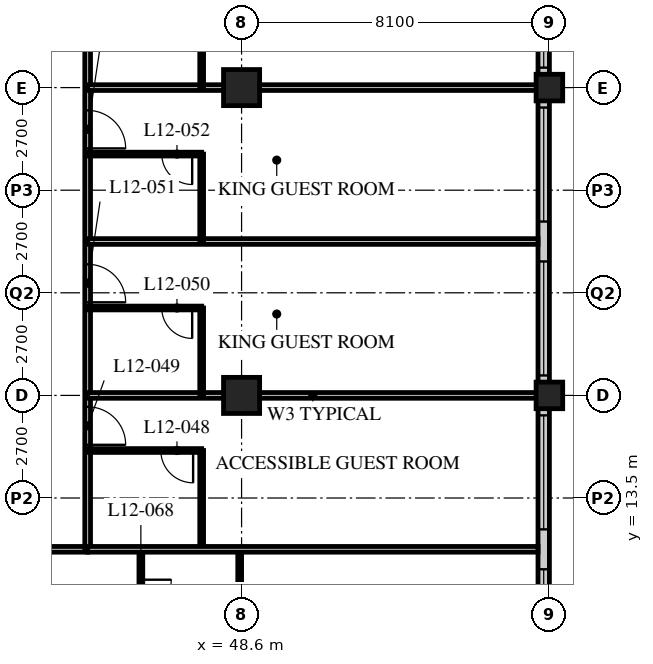
"""IFC4 building model, lengths in metres.
Left out: names, types, materials, properties, quantities, classifications, styles, units other than length and angle.
Written with IfcOpenShell. Run it as: python <this file> out.ifc"""

import sys

from ifc_helpers import new_model, si_unit, direction, frame, frame_2d, origin, origin_2d, place, context, subcontext, project, spatial, rectangle, hollow_rectangle, extrude, element, fill, save


model = new_model("IFC4")
c1 = context("Model", 3, precision=1e-05, world=origin(), true_north=direction((0.0, 1.0)))
c2 = subcontext(c1, "Body", "Model", "MODEL_VIEW")
j1 = project(units=[si_unit("LENGTHUNIT", "METRE"), si_unit("PLANEANGLEUNIT", "RADIAN")], contexts=[c1])
p1 = place(None, origin())
s1 = spatial("IfcSite", under=j1, at=p1, CompositionType="ELEMENT")
p2 = place(p1, origin())
s2 = spatial("IfcBuilding", under=s1, at=p2, CompositionType="ELEMENT")
p3 = place(p2, frame((0.0, 0.0, 53.4)))
s3 = spatial("IfcBuildingStorey", under=s2, at=p3, CompositionType="ELEMENT", Elevation=53.4)
for number, where, z_axis, x_axis in (
    (1, (48.6, 16.2, 0.0), (0.0, 0.0, 1.0), (1.0, 0.0, 0.0)),
    (2, (48.6, 24.3, 0.0), (0.0, 0.0, 1.0), (1.0, 0.0, 0.0)),
):
    element("IfcColumn", number, at=place(p3, frame(where, z_axis=z_axis, x_axis=x_axis)), inside=s3, PredefinedType="COLUMN", context=c2, shape_type="SweptSolid", body=[
        extrude(hollow_rectangle(XDim=0.95, YDim=0.95, WallThickness=0.095, at=origin_2d()), origin(), (0.0, 0.0, 1.0), 3.4),
    ])
for number, where, z_axis, x_axis in (
    (3, (56.7, 16.2, 0.0), (0.0, 0.0, 1.0), (1.0, 0.0, 0.0)),
    (4, (56.7, 24.3, 0.0), (0.0, 0.0, 1.0), (1.0, 0.0, 0.0)),
):
    element("IfcColumn", number, at=place(p3, frame(where, z_axis=z_axis, x_axis=x_axis)), inside=s3, PredefinedType="COLUMN", context=c2, shape_type="SweptSolid", body=[
        extrude(hollow_rectangle(XDim=0.7, YDim=0.7, WallThickness=0.06, at=origin_2d()), origin(), (0.0, 0.0, 1.0), 3.4),
    ])
p4 = place(p3, frame((56.55, 8.4, 0.0), z_axis=(0.0, 0.0, 1.0), x_axis=(0.0, 1.0, 0.0)))
e5 = element("IfcWall", 5, at=p4, inside=s3, PredefinedType="SOLIDWALL", context=c2, shape_type="SweptSolid", body=[
    extrude(rectangle(XDim=32.1, YDim=0.3, at=frame_2d((16.05, 0.0))), origin(), (0.0, 0.0, 1.0), 3.19),
])
p5 = place(p4, frame((0.225, 0.0, 0.9)))
e6 = element("IfcOpeningElement", 6, at=p5, cuts=e5, PredefinedType="OPENING", context=c2, shape_type="SweptSolid", body=[
    extrude(rectangle(XDim=3.0, YDim=2.0, at=frame_2d((1.5, 1.0))), frame((0.0, 0.16, 0.0), z_axis=(0.0, -1.0, 0.0), x_axis=(1.0, 0.0, 0.0)), (0.0, 0.0, 1.0), 0.32),
])
p6 = place(p4, frame((4.275, 0.0, 0.9)))
e7 = element("IfcOpeningElement", 7, at=p6, cuts=e5, PredefinedType="OPENING", context=c2, shape_type="SweptSolid", body=[
    extrude(rectangle(XDim=3.0, YDim=2.0, at=frame_2d((1.5, 1.0))), frame((0.0, 0.16, 0.0), z_axis=(0.0, -1.0, 0.0), x_axis=(1.0, 0.0, 0.0)), (0.0, 0.0, 1.0), 0.32),
])
p7 = place(p4, frame((8.325, 0.0, 0.9)))
e8 = element("IfcOpeningElement", 8, at=p7, cuts=e5, PredefinedType="OPENING", context=c2, shape_type="SweptSolid", body=[
    extrude(rectangle(XDim=3.0, YDim=2.0, at=frame_2d((1.5, 1.0))), frame((0.0, 0.16, 0.0), z_axis=(0.0, -1.0, 0.0), x_axis=(1.0, 0.0, 0.0)), (0.0, 0.0, 1.0), 0.32),
])
p8 = place(p4, frame((12.375, 0.0, 0.9)))
e9 = element("IfcOpeningElement", 9, at=p8, cuts=e5, PredefinedType="OPENING", context=c2, shape_type="SweptSolid", body=[
    extrude(rectangle(XDim=3.0, YDim=2.0, at=frame_2d((1.5, 1.0))), frame((0.0, 0.16, 0.0), z_axis=(0.0, -1.0, 0.0), x_axis=(1.0, 0.0, 0.0)), (0.0, 0.0, 1.0), 0.32),
])
p9 = place(p4, frame((16.425, 0.0, 0.9)))
e10 = element("IfcOpeningElement", 10, at=p9, cuts=e5, PredefinedType="OPENING", context=c2, shape_type="SweptSolid", body=[
    extrude(rectangle(XDim=3.0, YDim=2.0, at=frame_2d((1.5, 1.0))), frame((0.0, 0.16, 0.0), z_axis=(0.0, -1.0, 0.0), x_axis=(1.0, 0.0, 0.0)), (0.0, 0.0, 1.0), 0.32),
])
p10 = place(p4, frame((20.475, 0.0, 0.9)))
e11 = element("IfcOpeningElement", 11, at=p10, cuts=e5, PredefinedType="OPENING", context=c2, shape_type="SweptSolid", body=[
    extrude(rectangle(XDim=3.0, YDim=2.0, at=frame_2d((1.5, 1.0))), frame((0.0, 0.16, 0.0), z_axis=(0.0, -1.0, 0.0), x_axis=(1.0, 0.0, 0.0)), (0.0, 0.0, 1.0), 0.32),
])
p11 = place(p4, frame((24.525, 0.0, 0.9)))
e12 = element("IfcOpeningElement", 12, at=p11, cuts=e5, PredefinedType="OPENING", context=c2, shape_type="SweptSolid", body=[
    extrude(rectangle(XDim=3.0, YDim=2.0, at=frame_2d((1.5, 1.0))), frame((0.0, 0.16, 0.0), z_axis=(0.0, -1.0, 0.0), x_axis=(1.0, 0.0, 0.0)), (0.0, 0.0, 1.0), 0.32),
])
p12 = place(p4, frame((28.575, 0.0, 0.9)))
e13 = element("IfcOpeningElement", 13, at=p12, cuts=e5, PredefinedType="OPENING", context=c2, shape_type="SweptSolid", body=[
    extrude(rectangle(XDim=3.0, YDim=2.0, at=frame_2d((1.5, 1.0))), frame((0.0, 0.16, 0.0), z_axis=(0.0, -1.0, 0.0), x_axis=(1.0, 0.0, 0.0)), (0.0, 0.0, 1.0), 0.32),
])
p13 = place(p3, frame((12.15, 12.15, 0.0), z_axis=(0.0, 0.0, 1.0), x_axis=(1.0, 0.0, 0.0)))
e14 = element("IfcWall", 14, at=p13, inside=s3, PredefinedType="PARTITIONING", context=c2, shape_type="SweptSolid", body=[
    extrude(rectangle(XDim=32.4, YDim=0.15, at=frame_2d((16.2, 0.0))), origin(), (0.0, 0.0, 1.0), 3.19),
])
p14 = place(p13, frame((6.5, 0.0, 0.0)))
e15 = element("IfcOpeningElement", 15, at=p14, cuts=e14, PredefinedType="OPENING", context=c2, shape_type="SweptSolid", body=[
    extrude(rectangle(XDim=1.0, YDim=2.1, at=frame_2d((0.5, 1.05))), frame((0.0, 0.085, 0.0), z_axis=(0.0, -1.0, 0.0), x_axis=(1.0, 0.0, 0.0)), (0.0, 0.0, 1.0), 0.17),
])
p15 = place(p13, frame((8.4, 0.0, 0.0)))
e16 = element("IfcOpeningElement", 16, at=p15, cuts=e14, PredefinedType="OPENING", context=c2, shape_type="SweptSolid", body=[
    extrude(rectangle(XDim=1.0, YDim=2.1, at=frame_2d((0.5, 1.05))), frame((0.0, 0.085, 0.0), z_axis=(0.0, -1.0, 0.0), x_axis=(1.0, 0.0, 0.0)), (0.0, 0.0, 1.0), 0.17),
])
p16 = place(p13, frame((14.6, 0.0, 0.0)))
e17 = element("IfcOpeningElement", 17, at=p16, cuts=e14, PredefinedType="OPENING", context=c2, shape_type="SweptSolid", body=[
    extrude(rectangle(XDim=1.0, YDim=2.1, at=frame_2d((0.5, 1.05))), frame((0.0, 0.085, 0.0), z_axis=(0.0, -1.0, 0.0), x_axis=(1.0, 0.0, 0.0)), (0.0, 0.0, 1.0), 0.17),
])
p17 = place(p13, frame((18.65, 0.0, 0.0)))
e18 = element("IfcOpeningElement", 18, at=p17, cuts=e14, PredefinedType="OPENING", context=c2, shape_type="SweptSolid", body=[
    extrude(rectangle(XDim=1.0, YDim=2.1, at=frame_2d((0.5, 1.05))), frame((0.0, 0.085, 0.0), z_axis=(0.0, -1.0, 0.0), x_axis=(1.0, 0.0, 0.0)), (0.0, 0.0, 1.0), 0.17),
])
p18 = place(p13, frame((20.55, 0.0, 0.0)))
e19 = element("IfcOpeningElement", 19, at=p18, cuts=e14, PredefinedType="OPENING", context=c2, shape_type="SweptSolid", body=[
    extrude(rectangle(XDim=1.0, YDim=2.1, at=frame_2d((0.5, 1.05))), frame((0.0, 0.085, 0.0), z_axis=(0.0, -1.0, 0.0), x_axis=(1.0, 0.0, 0.0)), (0.0, 0.0, 1.0), 0.17),
])
p19 = place(p13, frame((26.75, 0.0, 0.0)))
e20 = element("IfcOpeningElement", 20, at=p19, cuts=e14, PredefinedType="OPENING", context=c2, shape_type="SweptSolid", body=[
    extrude(rectangle(XDim=1.0, YDim=2.1, at=frame_2d((0.5, 1.05))), frame((0.0, 0.085, 0.0), z_axis=(0.0, -1.0, 0.0), x_axis=(1.0, 0.0, 0.0)), (0.0, 0.0, 1.0), 0.17),
])
p20 = place(p13, frame((1.525, 0.0, 0.0)))
e21 = element("IfcOpeningElement", 21, at=p20, cuts=e14, PredefinedType="OPENING", context=c2, shape_type="SweptSolid", body=[
    extrude(rectangle(XDim=1.0, YDim=2.1, at=frame_2d((0.5, 1.05))), frame((0.0, 0.085, 0.0), z_axis=(0.0, -1.0, 0.0), x_axis=(1.0, 0.0, 0.0)), (0.0, 0.0, 1.0), 0.17),
])
p21 = place(p13, frame((29.875, 0.0, 0.0)))
e22 = element("IfcOpeningElement", 22, at=p21, cuts=e14, PredefinedType="OPENING", context=c2, shape_type="SweptSolid", body=[
    extrude(rectangle(XDim=1.0, YDim=2.1, at=frame_2d((0.5, 1.05))), frame((0.0, 0.085, 0.0), z_axis=(0.0, -1.0, 0.0), x_axis=(1.0, 0.0, 0.0)), (0.0, 0.0, 1.0), 0.17),
])
p22 = place(p3, frame((44.55, 12.15, 0.0), z_axis=(0.0, 0.0, 1.0), x_axis=(0.0, 1.0, 0.0)))
e23 = element("IfcWall", 23, at=p22, inside=s3, PredefinedType="PARTITIONING", context=c2, shape_type="SweptSolid", body=[
    extrude(rectangle(XDim=30.15, YDim=0.15, at=frame_2d((15.075, 0.0))), origin(), (0.0, 0.0, 1.0), 3.19),
])
p23 = place(p22, frame((2.75, 0.0, 0.0)))
e24 = element("IfcOpeningElement", 24, at=p23, cuts=e23, PredefinedType="OPENING", context=c2, shape_type="SweptSolid", body=[
    extrude(rectangle(XDim=1.0, YDim=2.1, at=frame_2d((0.5, 1.05))), frame((0.0, 0.085, 0.0), z_axis=(0.0, -1.0, 0.0), x_axis=(1.0, 0.0, 0.0)), (0.0, 0.0, 1.0), 0.17),
])
p24 = place(p22, frame((6.5, 0.0, 0.0)))
e25 = element("IfcOpeningElement", 25, at=p24, cuts=e23, PredefinedType="OPENING", context=c2, shape_type="SweptSolid", body=[
    extrude(rectangle(XDim=1.0, YDim=2.1, at=frame_2d((0.5, 1.05))), frame((0.0, 0.085, 0.0), z_axis=(0.0, -1.0, 0.0), x_axis=(1.0, 0.0, 0.0)), (0.0, 0.0, 1.0), 0.17),
])
p25 = place(p22, frame((10.55, 0.0, 0.0)))
e26 = element("IfcOpeningElement", 26, at=p25, cuts=e23, PredefinedType="OPENING", context=c2, shape_type="SweptSolid", body=[
    extrude(rectangle(XDim=1.0, YDim=2.1, at=frame_2d((0.5, 1.05))), frame((0.0, 0.085, 0.0), z_axis=(0.0, -1.0, 0.0), x_axis=(1.0, 0.0, 0.0)), (0.0, 0.0, 1.0), 0.17),
])
p26 = place(p22, frame((14.6, 0.0, 0.0)))
e27 = element("IfcOpeningElement", 27, at=p26, cuts=e23, PredefinedType="OPENING", context=c2, shape_type="SweptSolid", body=[
    extrude(rectangle(XDim=1.0, YDim=2.1, at=frame_2d((0.5, 1.05))), frame((0.0, 0.085, 0.0), z_axis=(0.0, -1.0, 0.0), x_axis=(1.0, 0.0, 0.0)), (0.0, 0.0, 1.0), 0.17),
])
p27 = place(p22, frame((18.65, 0.0, 0.0)))
e28 = element("IfcOpeningElement", 28, at=p27, cuts=e23, PredefinedType="OPENING", context=c2, shape_type="SweptSolid", body=[
    extrude(rectangle(XDim=1.0, YDim=2.1, at=frame_2d((0.5, 1.05))), frame((0.0, 0.085, 0.0), z_axis=(0.0, -1.0, 0.0), x_axis=(1.0, 0.0, 0.0)), (0.0, 0.0, 1.0), 0.17),
])
p28 = place(p22, frame((22.7, 0.0, 0.0)))
e29 = element("IfcOpeningElement", 29, at=p28, cuts=e23, PredefinedType="OPENING", context=c2, shape_type="SweptSolid", body=[
    extrude(rectangle(XDim=1.0, YDim=2.1, at=frame_2d((0.5, 1.05))), frame((0.0, 0.085, 0.0), z_axis=(0.0, -1.0, 0.0), x_axis=(1.0, 0.0, 0.0)), (0.0, 0.0, 1.0), 0.17),
])
p29 = place(p22, frame((26.7, 0.0, 0.0)))
e30 = element("IfcOpeningElement", 30, at=p29, cuts=e23, PredefinedType="OPENING", context=c2, shape_type="SweptSolid", body=[
    extrude(rectangle(XDim=1.0, YDim=2.1, at=frame_2d((0.5, 1.05))), frame((0.0, 0.085, 0.0), z_axis=(0.0, -1.0, 0.0), x_axis=(1.0, 0.0, 0.0)), (0.0, 0.0, 1.0), 0.17),
])
p30 = place(p3, frame((47.55, 12.15, 0.0), z_axis=(0.0, 0.0, 1.0), x_axis=(0.0, 1.0, 0.0)))
e31 = element("IfcWall", 31, at=p30, inside=s3, PredefinedType="PARTITIONING", context=c2, shape_type="SweptSolid", body=[
    extrude(rectangle(XDim=2.6, YDim=0.1, at=frame_2d((1.3, 0.0))), origin(), (0.0, 0.0, 1.0), 3.19),
])
p31 = place(p3, frame((44.55, 14.75, 0.0), z_axis=(0.0, 0.0, 1.0), x_axis=(1.0, 0.0, 0.0)))
e32 = element("IfcWall", 32, at=p31, inside=s3, PredefinedType="PARTITIONING", context=c2, shape_type="SweptSolid", body=[
    extrude(rectangle(XDim=3.0, YDim=0.1, at=frame_2d((1.5, 0.0))), origin(), (0.0, 0.0, 1.0), 3.19),
])
p32 = place(p31, frame((1.925, 0.0, 0.0)))
e33 = element("IfcOpeningElement", 33, at=p32, cuts=e32, PredefinedType="OPENING", context=c2, shape_type="SweptSolid", body=[
    extrude(rectangle(XDim=0.85, YDim=2.1, at=frame_2d((0.425, 1.05))), frame((0.0, 0.06, 0.0), z_axis=(0.0, -1.0, 0.0), x_axis=(1.0, 0.0, 0.0)), (0.0, 0.0, 1.0), 0.12),
])
p33 = place(p3, frame((44.55, 16.2, 0.0), z_axis=(0.0, 0.0, 1.0), x_axis=(1.0, 0.0, 0.0)))
e34 = element("IfcWall", 34, at=p33, inside=s3, PredefinedType="PARTITIONING", context=c2, shape_type="SweptSolid", body=[
    extrude(rectangle(XDim=11.85, YDim=0.15, at=frame_2d((5.925, 0.0))), origin(), (0.0, 0.0, 1.0), 2.578),
])
p34 = place(p3, frame((47.55, 16.2, 0.0), z_axis=(0.0, 0.0, 1.0), x_axis=(0.0, 1.0, 0.0)))
e35 = element("IfcWall", 35, at=p34, inside=s3, PredefinedType="PARTITIONING", context=c2, shape_type="SweptSolid", body=[
    extrude(rectangle(XDim=2.3, YDim=0.1, at=frame_2d((1.15, 0.0))), origin(), (0.0, 0.0, 1.0), 3.19),
])
p35 = place(p3, frame((44.55, 18.5, 0.0), z_axis=(0.0, 0.0, 1.0), x_axis=(1.0, 0.0, 0.0)))
e36 = element("IfcWall", 36, at=p35, inside=s3, PredefinedType="PARTITIONING", context=c2, shape_type="SweptSolid", body=[
    extrude(rectangle(XDim=3.0, YDim=0.1, at=frame_2d((1.5, 0.0))), origin(), (0.0, 0.0, 1.0), 3.19),
])
p36 = place(p35, frame((1.95, 0.0, 0.0)))
e37 = element("IfcOpeningElement", 37, at=p36, cuts=e36, PredefinedType="OPENING", context=c2, shape_type="SweptSolid", body=[
    extrude(rectangle(XDim=0.8, YDim=2.1, at=frame_2d((0.4, 1.05))), frame((0.0, 0.06, 0.0), z_axis=(0.0, -1.0, 0.0), x_axis=(1.0, 0.0, 0.0)), (0.0, 0.0, 1.0), 0.12),
])
p37 = place(p3, frame((44.55, 20.25, 0.0), z_axis=(0.0, 0.0, 1.0), x_axis=(1.0, 0.0, 0.0)))
e38 = element("IfcWall", 38, at=p37, inside=s3, PredefinedType="PARTITIONING", context=c2, shape_type="SweptSolid", body=[
    extrude(rectangle(XDim=11.85, YDim=0.15, at=frame_2d((5.925, 0.0))), origin(), (0.0, 0.0, 1.0), 3.19),
])
p38 = place(p3, frame((47.55, 20.25, 0.0), z_axis=(0.0, 0.0, 1.0), x_axis=(0.0, 1.0, 0.0)))
e39 = element("IfcWall", 39, at=p38, inside=s3, PredefinedType="PARTITIONING", context=c2, shape_type="SweptSolid", body=[
    extrude(rectangle(XDim=2.3, YDim=0.1, at=frame_2d((1.15, 0.0))), origin(), (0.0, 0.0, 1.0), 3.19),
])
p39 = place(p3, frame((44.55, 22.55, 0.0), z_axis=(0.0, 0.0, 1.0), x_axis=(1.0, 0.0, 0.0)))
e40 = element("IfcWall", 40, at=p39, inside=s3, PredefinedType="PARTITIONING", context=c2, shape_type="SweptSolid", body=[
    extrude(rectangle(XDim=3.0, YDim=0.1, at=frame_2d((1.5, 0.0))), origin(), (0.0, 0.0, 1.0), 3.19),
])
p40 = place(p39, frame((1.95, 0.0, 0.0)))
e41 = element("IfcOpeningElement", 41, at=p40, cuts=e40, PredefinedType="OPENING", context=c2, shape_type="SweptSolid", body=[
    extrude(rectangle(XDim=0.8, YDim=2.1, at=frame_2d((0.4, 1.05))), frame((0.0, 0.06, 0.0), z_axis=(0.0, -1.0, 0.0), x_axis=(1.0, 0.0, 0.0)), (0.0, 0.0, 1.0), 0.12),
])
p41 = place(p3, frame((44.55, 24.3, 0.0), z_axis=(0.0, 0.0, 1.0), x_axis=(1.0, 0.0, 0.0)))
e42 = element("IfcWall", 42, at=p41, inside=s3, PredefinedType="PARTITIONING", context=c2, shape_type="SweptSolid", body=[
    extrude(rectangle(XDim=11.85, YDim=0.15, at=frame_2d((5.925, 0.0))), origin(), (0.0, 0.0, 1.0), 2.578),
])
p42 = place(p3, frame((47.55, 24.3, 0.0), z_axis=(0.0, 0.0, 1.0), x_axis=(0.0, 1.0, 0.0)))
e43 = element("IfcWall", 43, at=p42, inside=s3, PredefinedType="PARTITIONING", context=c2, shape_type="SweptSolid", body=[
    extrude(rectangle(XDim=2.3, YDim=0.1, at=frame_2d((1.15, 0.0))), origin(), (0.0, 0.0, 1.0), 3.19),
])
p43 = place(p3, frame((45.95, 12.15, 0.0), z_axis=(0.0, 0.0, 1.0), x_axis=(0.0, -1.0, 0.0)))
e44 = element("IfcWall", 44, at=p43, inside=s3, PredefinedType="PARTITIONING", context=c2, shape_type="SweptSolid", body=[
    extrude(rectangle(XDim=2.4, YDim=0.1, at=frame_2d((1.2, 0.0))), origin(), (0.0, 0.0, 1.0), 3.19),
])
p44 = place(p43, frame((0.8, 0.0, 0.0)))
e45 = element("IfcOpeningElement", 45, at=p44, cuts=e44, PredefinedType="OPENING", context=c2, shape_type="SweptSolid", body=[
    extrude(rectangle(XDim=0.8, YDim=2.1, at=frame_2d((0.4, 1.05))), frame((0.0, 0.06, 0.0), z_axis=(0.0, -1.0, 0.0), x_axis=(1.0, 0.0, 0.0)), (0.0, 0.0, 1.0), 0.12),
])
p45 = place(p3, frame((48.55, 12.15, 0.0), z_axis=(0.0, 0.0, 1.0), x_axis=(0.0, -1.0, 0.0)))
e46 = element("IfcWall", 46, at=p45, inside=s3, PredefinedType="PARTITIONING", context=c2, shape_type="SweptSolid", body=[
    extrude(rectangle(XDim=2.4, YDim=0.1, at=frame_2d((1.2, 0.0))), origin(), (0.0, 0.0, 1.0), 2.578),
])
p46 = place(p3, frame((44.55, 12.15, 0.0), z_axis=(0.0, 0.0, 1.0), x_axis=(1.0, 0.0, 0.0)))
e47 = element("IfcWall", 47, at=p46, inside=s3, PredefinedType="PARTITIONING", context=c2, shape_type="SweptSolid", body=[
    extrude(rectangle(XDim=11.85, YDim=0.15, at=frame_2d((5.925, 0.0))), origin(), (0.0, 0.0, 1.0), 3.19),
])
p47 = place(p5, origin())
e48 = element("IfcWindow", 48, at=p47, inside=s3, PartitioningType="SINGLE_PANEL", PredefinedType="WINDOW", context=c2, shape_type="SweptSolid", body=[
    extrude(rectangle(XDim=3.0, YDim=2.0, at=frame_2d((1.5, 1.0))), frame((0.0, 0.03, 0.0), z_axis=(0.0, -1.0, 0.0), x_axis=(1.0, 0.0, 0.0)), (0.0, 0.0, 1.0), 0.06),
])
fill(e6, e48)
p48 = place(p6, origin())
e49 = element("IfcWindow", 49, at=p48, inside=s3, PartitioningType="SINGLE_PANEL", PredefinedType="WINDOW", context=c2, shape_type="SweptSolid", body=[
    extrude(rectangle(XDim=3.0, YDim=2.0, at=frame_2d((1.5, 1.0))), frame((0.0, 0.03, 0.0), z_axis=(0.0, -1.0, 0.0), x_axis=(1.0, 0.0, 0.0)), (0.0, 0.0, 1.0), 0.06),
])
fill(e7, e49)
p49 = place(p7, origin())
e50 = element("IfcWindow", 50, at=p49, inside=s3, PartitioningType="SINGLE_PANEL", PredefinedType="WINDOW", context=c2, shape_type="SweptSolid", body=[
    extrude(rectangle(XDim=3.0, YDim=2.0, at=frame_2d((1.5, 1.0))), frame((0.0, 0.03, 0.0), z_axis=(0.0, -1.0, 0.0), x_axis=(1.0, 0.0, 0.0)), (0.0, 0.0, 1.0), 0.06),
])
fill(e8, e50)
p50 = place(p8, origin())
e51 = element("IfcWindow", 51, at=p50, inside=s3, PartitioningType="SINGLE_PANEL", PredefinedType="WINDOW", context=c2, shape_type="SweptSolid", body=[
    extrude(rectangle(XDim=3.0, YDim=2.0, at=frame_2d((1.5, 1.0))), frame((0.0, 0.03, 0.0), z_axis=(0.0, -1.0, 0.0), x_axis=(1.0, 0.0, 0.0)), (0.0, 0.0, 1.0), 0.06),
])
fill(e9, e51)
p51 = place(p9, origin())
e52 = element("IfcWindow", 52, at=p51, inside=s3, PartitioningType="SINGLE_PANEL", PredefinedType="WINDOW", context=c2, shape_type="SweptSolid", body=[
    extrude(rectangle(XDim=3.0, YDim=2.0, at=frame_2d((1.5, 1.0))), frame((0.0, 0.03, 0.0), z_axis=(0.0, -1.0, 0.0), x_axis=(1.0, 0.0, 0.0)), (0.0, 0.0, 1.0), 0.06),
])
fill(e10, e52)
p52 = place(p32, origin())
e53 = element("IfcDoor", 53, at=p52, inside=s3, OperationType="SINGLE_SWING_LEFT", PredefinedType="DOOR", context=c2, shape_type="SweptSolid", body=[
    extrude(rectangle(XDim=0.85, YDim=2.1, at=frame_2d((0.425, 1.05))), frame((0.0, 0.025, 0.0), z_axis=(0.0, -1.0, 0.0), x_axis=(1.0, 0.0, 0.0)), (0.0, 0.0, 1.0), 0.05),
])
fill(e33, e53)
p53 = place(p23, origin())
e54 = element("IfcDoor", 54, at=p53, inside=s3, OperationType="SINGLE_SWING_RIGHT", PredefinedType="DOOR", context=c2, shape_type="SweptSolid", body=[
    extrude(rectangle(XDim=1.0, YDim=2.1, at=frame_2d((0.5, 1.05))), frame((0.0, 0.025, 0.0), z_axis=(0.0, -1.0, 0.0), x_axis=(1.0, 0.0, 0.0)), (0.0, 0.0, 1.0), 0.05),
])
fill(e24, e54)
p54 = place(p36, origin())
e55 = element("IfcDoor", 55, at=p54, inside=s3, OperationType="SINGLE_SWING_LEFT", PredefinedType="DOOR", context=c2, shape_type="SweptSolid", body=[
    extrude(rectangle(XDim=0.8, YDim=2.1, at=frame_2d((0.4, 1.05))), frame((0.0, 0.025, 0.0), z_axis=(0.0, -1.0, 0.0), x_axis=(1.0, 0.0, 0.0)), (0.0, 0.0, 1.0), 0.05),
])
fill(e37, e55)
p55 = place(p24, origin())
e56 = element("IfcDoor", 56, at=p55, inside=s3, OperationType="SINGLE_SWING_RIGHT", PredefinedType="DOOR", context=c2, shape_type="SweptSolid", body=[
    extrude(rectangle(XDim=1.0, YDim=2.1, at=frame_2d((0.5, 1.05))), frame((0.0, 0.025, 0.0), z_axis=(0.0, -1.0, 0.0), x_axis=(1.0, 0.0, 0.0)), (0.0, 0.0, 1.0), 0.05),
])
fill(e25, e56)
p56 = place(p40, origin())
e57 = element("IfcDoor", 57, at=p56, inside=s3, OperationType="SINGLE_SWING_LEFT", PredefinedType="DOOR", context=c2, shape_type="SweptSolid", body=[
    extrude(rectangle(XDim=0.8, YDim=2.1, at=frame_2d((0.4, 1.05))), frame((0.0, 0.025, 0.0), z_axis=(0.0, -1.0, 0.0), x_axis=(1.0, 0.0, 0.0)), (0.0, 0.0, 1.0), 0.05),
])
fill(e41, e57)
p57 = place(p25, origin())
e58 = element("IfcDoor", 58, at=p57, inside=s3, OperationType="SINGLE_SWING_RIGHT", PredefinedType="DOOR", context=c2, shape_type="SweptSolid", body=[
    extrude(rectangle(XDim=1.0, YDim=2.1, at=frame_2d((0.5, 1.05))), frame((0.0, 0.025, 0.0), z_axis=(0.0, -1.0, 0.0), x_axis=(1.0, 0.0, 0.0)), (0.0, 0.0, 1.0), 0.05),
])
fill(e26, e58)
p58 = place(p44, origin())
e59 = element("IfcDoor", 59, at=p58, inside=s3, OperationType="SINGLE_SWING_LEFT", PredefinedType="DOOR", context=c2, shape_type="SweptSolid", body=[
    extrude(rectangle(XDim=0.8, YDim=2.1, at=frame_2d((0.4, 1.05))), frame((0.0, 0.025, 0.0), z_axis=(0.0, -1.0, 0.0), x_axis=(1.0, 0.0, 0.0)), (0.0, 0.0, 1.0), 0.05),
])
fill(e45, e59)
save(model, sys.argv[1])
